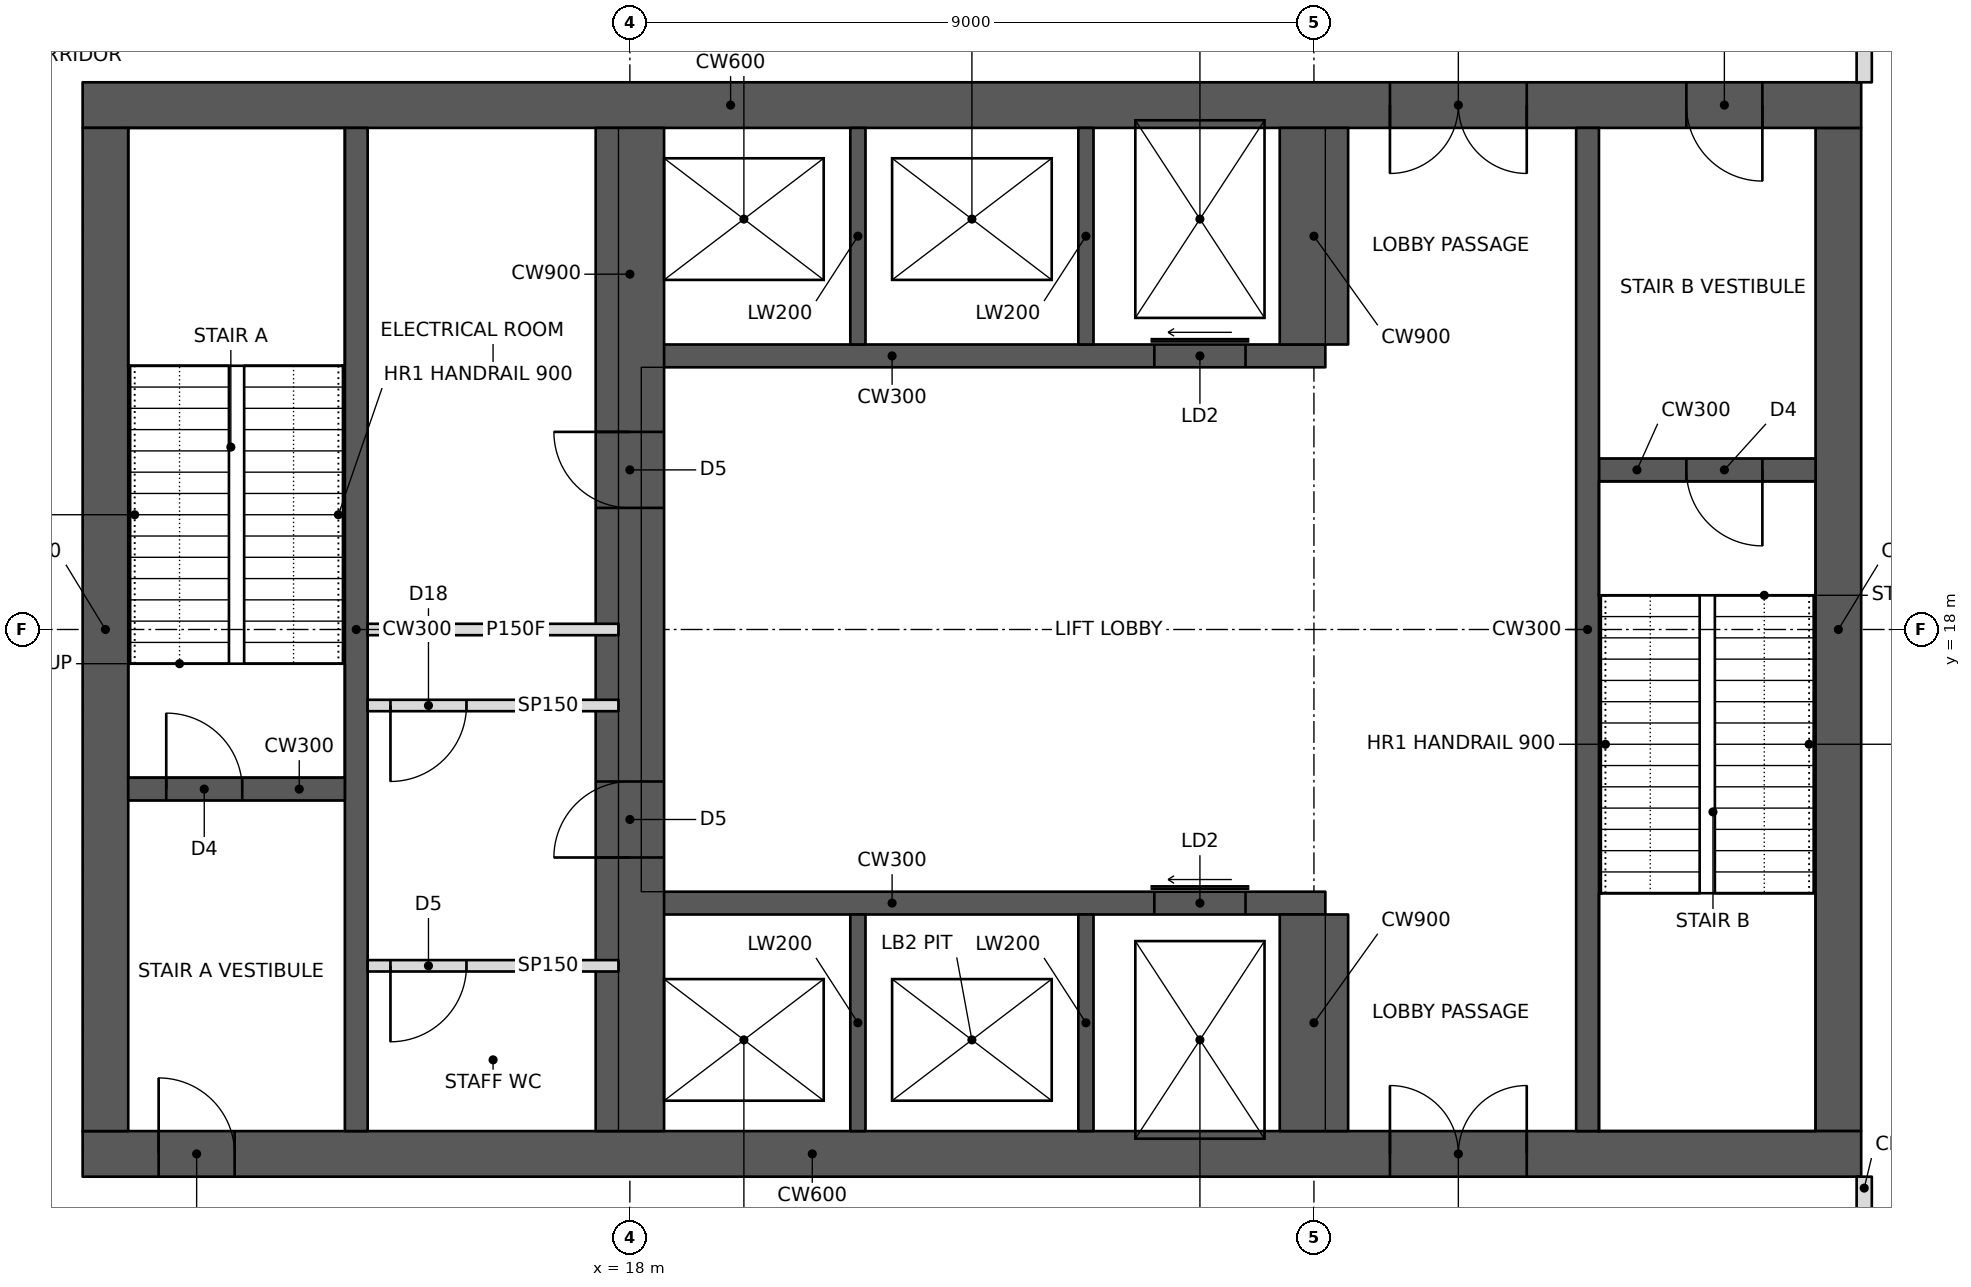
"""IFC4 building model, lengths in metres.
Left out: names, types, materials, properties, quantities, classifications, styles, units other than length and angle.
Written with IfcOpenShell. Run it as: python <this file> out.ifc"""

import sys

from ifc_helpers import new_model, si_unit, direction, frame, frame_2d, origin, place, context, subcontext, project, spatial, rectangle, extrude, element, fill, save


model = new_model("IFC4")
c1 = context("Model", 3, precision=1e-05, world=origin(), true_north=direction((0.0, 1.0)))
c2 = subcontext(c1, "Body", "Model", "MODEL_VIEW")
j1 = project(units=[si_unit("LENGTHUNIT", "METRE"), si_unit("PLANEANGLEUNIT", "RADIAN")], contexts=[c1])
p1 = place(None, origin())
s1 = spatial("IfcSite", under=j1, at=p1, CompositionType="ELEMENT")
p2 = place(p1, origin())
s2 = spatial("IfcBuilding", under=s1, at=p2, CompositionType="ELEMENT")
p3 = place(p2, frame((0.0, 0.0, 89.2)))
s3 = spatial("IfcBuildingStorey", under=s2, at=p3, CompositionType="ELEMENT", Elevation=89.2)
p4 = place(p3, frame((10.8, 11.1, 0.0), z_axis=(0.0, 0.0, 1.0), x_axis=(1.0, 0.0, 0.0)))
e1 = element("IfcWall", 1, at=p4, inside=s3, PredefinedType="SHEAR", context=c2, shape_type="SweptSolid", body=[
    extrude(rectangle(XDim=23.4, YDim=0.6, at=frame_2d((11.7, 0.0))), origin(), (0.0, 0.0, 1.0), 5.0),
])
p5 = place(p4, frame((1.0, 0.0, 0.0)))
e2 = element("IfcOpeningElement", 2, at=p5, cuts=e1, PredefinedType="OPENING", context=c2, shape_type="SweptSolid", body=[
    extrude(rectangle(XDim=1.0, YDim=2.1, at=frame_2d((0.5, 1.05))), frame((0.0, 0.31, 0.0), z_axis=(0.0, -1.0, 0.0), x_axis=(1.0, 0.0, 0.0)), (0.0, 0.0, 1.0), 0.62),
])
p6 = place(p4, frame((17.2, 0.0, 0.0)))
e3 = element("IfcOpeningElement", 3, at=p6, cuts=e1, PredefinedType="OPENING", context=c2, shape_type="SweptSolid", body=[
    extrude(rectangle(XDim=1.8, YDim=2.1, at=frame_2d((0.9, 1.05))), frame((0.0, 0.31, 0.0), z_axis=(0.0, -1.0, 0.0), x_axis=(1.0, 0.0, 0.0)), (0.0, 0.0, 1.0), 0.62),
])
p7 = place(p3, frame((10.8, 24.9, 0.0), z_axis=(0.0, 0.0, 1.0), x_axis=(1.0, 0.0, 0.0)))
e4 = element("IfcWall", 4, at=p7, inside=s3, PredefinedType="SHEAR", context=c2, shape_type="SweptSolid", body=[
    extrude(rectangle(XDim=23.4, YDim=0.6, at=frame_2d((11.7, 0.0))), origin(), (0.0, 0.0, 1.0), 5.0),
])
p8 = place(p7, frame((17.2, 0.0, 0.0)))
e5 = element("IfcOpeningElement", 5, at=p8, cuts=e4, PredefinedType="OPENING", context=c2, shape_type="SweptSolid", body=[
    extrude(rectangle(XDim=1.8, YDim=2.1, at=frame_2d((0.9, 1.05))), frame((0.0, 0.31, 0.0), z_axis=(0.0, -1.0, 0.0), x_axis=(1.0, 0.0, 0.0)), (0.0, 0.0, 1.0), 0.62),
])
p9 = place(p7, frame((21.1, 0.0, 0.0)))
e6 = element("IfcOpeningElement", 6, at=p9, cuts=e4, PredefinedType="OPENING", context=c2, shape_type="SweptSolid", body=[
    extrude(rectangle(XDim=1.0, YDim=2.1, at=frame_2d((0.5, 1.05))), frame((0.0, 0.31, 0.0), z_axis=(0.0, -1.0, 0.0), x_axis=(1.0, 0.0, 0.0)), (0.0, 0.0, 1.0), 0.62),
])
for number, where, z_axis, x_axis in (
    (7, (11.1, 11.4, 0.0), (0.0, 0.0, 1.0), (0.0, 1.0, 0.0)),
    (8, (33.9, 11.4, 0.0), (0.0, 0.0, 1.0), (0.0, 1.0, 0.0)),
):
    element("IfcWall", number, at=place(p3, frame(where, z_axis=z_axis, x_axis=x_axis)), inside=s3, PredefinedType="SHEAR", context=c2, shape_type="SweptSolid", body=[
        extrude(rectangle(XDim=13.2, YDim=0.6, at=frame_2d((6.6, 0.0))), origin(), (0.0, 0.0, 1.0), 5.0),
    ])
p10 = place(p3, frame((14.4, 11.4, 0.0), z_axis=(0.0, 0.0, 1.0), x_axis=(0.0, 1.0, 0.0)))
e9 = element("IfcWall", 9, at=p10, inside=s3, PredefinedType="SHEAR", context=c2, shape_type="SweptSolid", body=[
    extrude(rectangle(XDim=13.2, YDim=0.3, at=frame_2d((6.6, 0.0))), origin(), (0.0, 0.0, 1.0), 5.0),
])
p11 = place(p3, frame((11.4, 15.9, 0.0), z_axis=(0.0, 0.0, 1.0), x_axis=(1.0, 0.0, 0.0)))
e10 = element("IfcWall", 10, at=p11, inside=s3, PredefinedType="SHEAR", context=c2, shape_type="SweptSolid", body=[
    extrude(rectangle(XDim=2.85, YDim=0.3, at=frame_2d((1.425, 0.0))), origin(), (0.0, 0.0, 1.0), 5.0),
])
p12 = place(p11, frame((0.5, 0.0, 0.0)))
e11 = element("IfcOpeningElement", 11, at=p12, cuts=e10, PredefinedType="OPENING", context=c2, shape_type="SweptSolid", body=[
    extrude(rectangle(XDim=1.0, YDim=2.1, at=frame_2d((0.5, 1.05))), frame((0.0, 0.16, 0.0), z_axis=(0.0, -1.0, 0.0), x_axis=(1.0, 0.0, 0.0)), (0.0, 0.0, 1.0), 0.32),
])
p13 = place(p3, frame((18.0, 11.4, 0.0), z_axis=(0.0, 0.0, 1.0), x_axis=(0.0, 1.0, 0.0)))
e12 = element("IfcWall", 12, at=p13, inside=s3, PredefinedType="SHEAR", context=c2, shape_type="SweptSolid", body=[
    extrude(rectangle(XDim=13.2, YDim=0.9, at=frame_2d((6.6, 0.0))), origin(), (0.0, 0.0, 1.0), 5.0),
])
p14 = place(p13, frame((3.6, 0.0, 0.0)))
e13 = element("IfcOpeningElement", 13, at=p14, cuts=e12, PredefinedType="OPENING", context=c2, shape_type="SweptSolid", body=[
    extrude(rectangle(XDim=1.0, YDim=2.1, at=frame_2d((0.5, 1.05))), frame((0.0, 0.46, 0.0), z_axis=(0.0, -1.0, 0.0), x_axis=(1.0, 0.0, 0.0)), (0.0, 0.0, 1.0), 0.92),
])
p15 = place(p13, frame((8.2, 0.0, 0.0)))
e14 = element("IfcOpeningElement", 14, at=p15, cuts=e12, PredefinedType="OPENING", context=c2, shape_type="SweptSolid", body=[
    extrude(rectangle(XDim=1.0, YDim=2.1, at=frame_2d((0.5, 1.05))), frame((0.0, 0.46, 0.0), z_axis=(0.0, -1.0, 0.0), x_axis=(1.0, 0.0, 0.0)), (0.0, 0.0, 1.0), 0.92),
])
p16 = place(p3, frame((14.55, 18.0, 0.0), z_axis=(0.0, 0.0, 1.0), x_axis=(1.0, 0.0, 0.0)))
e15 = element("IfcWall", 15, at=p16, inside=s3, PredefinedType="PARTITIONING", context=c2, shape_type="SweptSolid", body=[
    extrude(rectangle(XDim=3.3, YDim=0.15, at=frame_2d((1.65, 0.0))), origin(), (0.0, 0.0, 1.0), 4.8),
])
p17 = place(p3, frame((18.15, 14.4, 0.0), z_axis=(0.0, 0.0, 1.0), x_axis=(1.0, 0.0, 0.0)))
e16 = element("IfcWall", 16, at=p17, inside=s3, PredefinedType="SHEAR", context=c2, shape_type="SweptSolid", body=[
    extrude(rectangle(XDim=9.0, YDim=0.3, at=frame_2d((4.5, 0.0))), origin(), (0.0, 0.0, 1.0), 5.0),
])
p18 = place(p17, frame((6.75, 0.0, 0.0)))
e17 = element("IfcOpeningElement", 17, at=p18, cuts=e16, PredefinedType="OPENING", context=c2, shape_type="SweptSolid", body=[
    extrude(rectangle(XDim=1.2, YDim=2.1, at=frame_2d((0.6, 1.05))), frame((0.0, 0.16, 0.0), z_axis=(0.0, -1.0, 0.0), x_axis=(1.0, 0.0, 0.0)), (0.0, 0.0, 1.0), 0.32),
])
p19 = place(p3, frame((27.0, 11.4, 0.0), z_axis=(0.0, 0.0, 1.0), x_axis=(0.0, 1.0, 0.0)))
e18 = element("IfcWall", 18, at=p19, inside=s3, PredefinedType="SHEAR", context=c2, shape_type="SweptSolid", body=[
    extrude(rectangle(XDim=2.85, YDim=0.9, at=frame_2d((1.425, 0.0))), origin(), (0.0, 0.0, 1.0), 5.0),
])
for number, where, z_axis, x_axis in (
    (19, (21.0, 11.4, 0.0), (0.0, 0.0, 1.0), (0.0, 1.0, 0.0)),
    (20, (24.0, 11.4, 0.0), (0.0, 0.0, 1.0), (0.0, 1.0, 0.0)),
):
    element("IfcWall", number, at=place(p3, frame(where, z_axis=z_axis, x_axis=x_axis)), inside=s3, PredefinedType="SHEAR", context=c2, shape_type="SweptSolid", body=[
        extrude(rectangle(XDim=2.85, YDim=0.2, at=frame_2d((1.425, 0.0))), origin(), (0.0, 0.0, 1.0), 5.0),
    ])
p20 = place(p3, frame((18.15, 21.6, 0.0), z_axis=(0.0, 0.0, 1.0), x_axis=(1.0, 0.0, 0.0)))
e21 = element("IfcWall", 21, at=p20, inside=s3, PredefinedType="SHEAR", context=c2, shape_type="SweptSolid", body=[
    extrude(rectangle(XDim=9.0, YDim=0.3, at=frame_2d((4.5, 0.0))), origin(), (0.0, 0.0, 1.0), 5.0),
])
p21 = place(p20, frame((6.75, 0.0, 0.0)))
e22 = element("IfcOpeningElement", 22, at=p21, cuts=e21, PredefinedType="OPENING", context=c2, shape_type="SweptSolid", body=[
    extrude(rectangle(XDim=1.2, YDim=2.1, at=frame_2d((0.6, 1.05))), frame((0.0, 0.16, 0.0), z_axis=(0.0, -1.0, 0.0), x_axis=(1.0, 0.0, 0.0)), (0.0, 0.0, 1.0), 0.32),
])
p22 = place(p3, frame((27.0, 21.75, 0.0), z_axis=(0.0, 0.0, 1.0), x_axis=(0.0, 1.0, 0.0)))
e23 = element("IfcWall", 23, at=p22, inside=s3, PredefinedType="SHEAR", context=c2, shape_type="SweptSolid", body=[
    extrude(rectangle(XDim=2.85, YDim=0.9, at=frame_2d((1.425, 0.0))), origin(), (0.0, 0.0, 1.0), 5.0),
])
for number, where, z_axis, x_axis in (
    (24, (21.0, 21.75, 0.0), (0.0, 0.0, 1.0), (0.0, 1.0, 0.0)),
    (25, (24.0, 21.75, 0.0), (0.0, 0.0, 1.0), (0.0, 1.0, 0.0)),
):
    element("IfcWall", number, at=place(p3, frame(where, z_axis=z_axis, x_axis=x_axis)), inside=s3, PredefinedType="SHEAR", context=c2, shape_type="SweptSolid", body=[
        extrude(rectangle(XDim=2.85, YDim=0.2, at=frame_2d((1.425, 0.0))), origin(), (0.0, 0.0, 1.0), 5.0),
    ])
p23 = place(p3, frame((30.6, 11.4, 0.0), z_axis=(0.0, 0.0, 1.0), x_axis=(0.0, 1.0, 0.0)))
e26 = element("IfcWall", 26, at=p23, inside=s3, PredefinedType="SHEAR", context=c2, shape_type="SweptSolid", body=[
    extrude(rectangle(XDim=13.2, YDim=0.3, at=frame_2d((6.6, 0.0))), origin(), (0.0, 0.0, 1.0), 5.0),
])
p24 = place(p3, frame((30.75, 20.1, 0.0), z_axis=(0.0, 0.0, 1.0), x_axis=(1.0, 0.0, 0.0)))
e27 = element("IfcWall", 27, at=p24, inside=s3, PredefinedType="SHEAR", context=c2, shape_type="SweptSolid", body=[
    extrude(rectangle(XDim=2.85, YDim=0.3, at=frame_2d((1.425, 0.0))), origin(), (0.0, 0.0, 1.0), 5.0),
])
p25 = place(p24, frame((1.15, 0.0, 0.0)))
e28 = element("IfcOpeningElement", 28, at=p25, cuts=e27, PredefinedType="OPENING", context=c2, shape_type="SweptSolid", body=[
    extrude(rectangle(XDim=1.0, YDim=2.1, at=frame_2d((0.5, 1.05))), frame((0.0, 0.16, 0.0), z_axis=(0.0, -1.0, 0.0), x_axis=(1.0, 0.0, 0.0)), (0.0, 0.0, 1.0), 0.32),
])
p26 = place(p3, frame((34.24, 9.1, 0.0), z_axis=(0.0, 0.0, 1.0), x_axis=(0.0, 1.0, 0.0)))
e29 = element("IfcWall", 29, at=p26, inside=s3, PredefinedType="PARTITIONING", context=c2, shape_type="SweptSolid", body=[
    extrude(rectangle(XDim=1.7, YDim=0.2, at=frame_2d((0.85, 0.0))), origin(), (0.0, 0.0, 1.0), 4.004),
])
p27 = place(p26, frame((0.25, 0.0, 0.0)))
e30 = element("IfcOpeningElement", 30, at=p27, cuts=e29, PredefinedType="OPENING", context=c2, shape_type="SweptSolid", body=[
    extrude(rectangle(XDim=1.0, YDim=2.1, at=frame_2d((0.5, 1.05))), frame((0.0, 0.11, 0.0), z_axis=(0.0, -1.0, 0.0), x_axis=(1.0, 0.0, 0.0)), (0.0, 0.0, 1.0), 0.22),
])
p28 = place(p3, frame((34.24, 25.2, 0.0), z_axis=(0.0, 0.0, 1.0), x_axis=(0.0, 1.0, 0.0)))
e31 = element("IfcWall", 31, at=p28, inside=s3, PredefinedType="PARTITIONING", context=c2, shape_type="SweptSolid", body=[
    extrude(rectangle(XDim=1.7, YDim=0.2, at=frame_2d((0.85, 0.0))), origin(), (0.0, 0.0, 1.0), 4.004),
])
p29 = place(p3, frame((14.55, 17.0, 0.0), z_axis=(0.0, 0.0, 1.0), x_axis=(1.0, 0.0, 0.0)))
e32 = element("IfcWall", 32, at=p29, inside=s3, PredefinedType="PARTITIONING", context=c2, shape_type="SweptSolid", body=[
    extrude(rectangle(XDim=3.3, YDim=0.15, at=frame_2d((1.65, 0.0))), origin(), (0.0, 0.0, 1.0), 4.8),
])
p30 = place(p29, frame((0.3, 0.0, 0.0)))
e33 = element("IfcOpeningElement", 33, at=p30, cuts=e32, PredefinedType="OPENING", context=c2, shape_type="SweptSolid", body=[
    extrude(rectangle(XDim=1.0, YDim=2.1, at=frame_2d((0.5, 1.05))), frame((0.0, 0.085, 0.0), z_axis=(0.0, -1.0, 0.0), x_axis=(1.0, 0.0, 0.0)), (0.0, 0.0, 1.0), 0.17),
])
p31 = place(p3, frame((14.55, 13.575, 0.0), z_axis=(0.0, 0.0, 1.0), x_axis=(1.0, 0.0, 0.0)))
e34 = element("IfcWall", 34, at=p31, inside=s3, PredefinedType="PARTITIONING", context=c2, shape_type="SweptSolid", body=[
    extrude(rectangle(XDim=3.3, YDim=0.15, at=frame_2d((1.65, 0.0))), origin(), (0.0, 0.0, 1.0), 4.8),
])
p32 = place(p31, frame((0.3, 0.0, 0.0)))
e35 = element("IfcOpeningElement", 35, at=p32, cuts=e34, PredefinedType="OPENING", context=c2, shape_type="SweptSolid", body=[
    extrude(rectangle(XDim=1.0, YDim=2.1, at=frame_2d((0.5, 1.05))), frame((0.0, 0.085, 0.0), z_axis=(0.0, -1.0, 0.0), x_axis=(1.0, 0.0, 0.0)), (0.0, 0.0, 1.0), 0.17),
])
p33 = place(p30, frame((1.0, 0.0, 0.0), z_axis=(0.0, 0.0, 1.0), x_axis=(-1.0, 0.0, 0.0)))
e36 = element("IfcDoor", 36, at=p33, inside=s3, OperationType="SINGLE_SWING_RIGHT", PredefinedType="DOOR", context=c2, shape_type="SweptSolid", body=[
    extrude(rectangle(XDim=1.0, YDim=2.1, at=frame_2d((0.5, 1.05))), frame((0.0, 0.025, 0.0), z_axis=(0.0, -1.0, 0.0), x_axis=(1.0, 0.0, 0.0)), (0.0, 0.0, 1.0), 0.05),
])
fill(e33, e36)
p34 = place(p32, frame((1.0, 0.0, 0.0), z_axis=(0.0, 0.0, 1.0), x_axis=(-1.0, 0.0, 0.0)))
e37 = element("IfcDoor", 37, at=p34, inside=s3, OperationType="SINGLE_SWING_RIGHT", PredefinedType="DOOR", context=c2, shape_type="SweptSolid", body=[
    extrude(rectangle(XDim=1.0, YDim=2.1, at=frame_2d((0.5, 1.05))), frame((0.0, 0.025, 0.0), z_axis=(0.0, -1.0, 0.0), x_axis=(1.0, 0.0, 0.0)), (0.0, 0.0, 1.0), 0.05),
])
fill(e35, e37)
p35 = place(p5, origin())
e38 = element("IfcDoor", 38, at=p35, inside=s3, OperationType="SINGLE_SWING_LEFT", PredefinedType="DOOR", context=c2, shape_type="SweptSolid", body=[
    extrude(rectangle(XDim=1.0, YDim=2.1, at=frame_2d((0.5, 1.05))), frame((0.0, 0.025, 0.0), z_axis=(0.0, -1.0, 0.0), x_axis=(1.0, 0.0, 0.0)), (0.0, 0.0, 1.0), 0.05),
])
fill(e2, e38)
p36 = place(p12, origin())
e39 = element("IfcDoor", 39, at=p36, inside=s3, OperationType="SINGLE_SWING_LEFT", PredefinedType="DOOR", context=c2, shape_type="SweptSolid", body=[
    extrude(rectangle(XDim=1.0, YDim=2.1, at=frame_2d((0.5, 1.05))), frame((0.0, 0.025, 0.0), z_axis=(0.0, -1.0, 0.0), x_axis=(1.0, 0.0, 0.0)), (0.0, 0.0, 1.0), 0.05),
])
fill(e11, e39)
p37 = place(p6, origin())
e40 = element("IfcDoor", 40, at=p37, inside=s3, OperationType="DOUBLE_DOOR_SINGLE_SWING", PredefinedType="DOOR", context=c2, shape_type="SweptSolid", body=[
    extrude(rectangle(XDim=1.8, YDim=2.1, at=frame_2d((0.9, 1.05))), frame((0.0, 0.025, 0.0), z_axis=(0.0, -1.0, 0.0), x_axis=(1.0, 0.0, 0.0)), (0.0, 0.0, 1.0), 0.05),
])
fill(e3, e40)
p38 = place(p8, frame((1.8, 0.0, 0.0), z_axis=(0.0, 0.0, 1.0), x_axis=(-1.0, 0.0, 0.0)))
e41 = element("IfcDoor", 41, at=p38, inside=s3, OperationType="DOUBLE_DOOR_SINGLE_SWING", PredefinedType="DOOR", context=c2, shape_type="SweptSolid", body=[
    extrude(rectangle(XDim=1.8, YDim=2.1, at=frame_2d((0.9, 1.05))), frame((0.0, 0.025, 0.0), z_axis=(0.0, -1.0, 0.0), x_axis=(1.0, 0.0, 0.0)), (0.0, 0.0, 1.0), 0.05),
])
fill(e5, e41)
p39 = place(p9, frame((1.0, 0.0, 0.0), z_axis=(0.0, 0.0, 1.0), x_axis=(-1.0, 0.0, 0.0)))
e42 = element("IfcDoor", 42, at=p39, inside=s3, OperationType="SINGLE_SWING_LEFT", PredefinedType="DOOR", context=c2, shape_type="SweptSolid", body=[
    extrude(rectangle(XDim=1.0, YDim=2.1, at=frame_2d((0.5, 1.05))), frame((0.0, 0.025, 0.0), z_axis=(0.0, -1.0, 0.0), x_axis=(1.0, 0.0, 0.0)), (0.0, 0.0, 1.0), 0.05),
])
fill(e6, e42)
p40 = place(p25, frame((1.0, 0.0, 0.0), z_axis=(0.0, 0.0, 1.0), x_axis=(-1.0, 0.0, 0.0)))
e43 = element("IfcDoor", 43, at=p40, inside=s3, OperationType="SINGLE_SWING_LEFT", PredefinedType="DOOR", context=c2, shape_type="SweptSolid", body=[
    extrude(rectangle(XDim=1.0, YDim=2.1, at=frame_2d((0.5, 1.05))), frame((0.0, 0.025, 0.0), z_axis=(0.0, -1.0, 0.0), x_axis=(1.0, 0.0, 0.0)), (0.0, 0.0, 1.0), 0.05),
])
fill(e28, e43)
p41 = place(p14, origin())
e44 = element("IfcDoor", 44, at=p41, inside=s3, OperationType="SINGLE_SWING_LEFT", PredefinedType="DOOR", context=c2, shape_type="SweptSolid", body=[
    extrude(rectangle(XDim=1.0, YDim=2.1, at=frame_2d((0.5, 1.05))), frame((0.0, 0.025, 0.0), z_axis=(0.0, -1.0, 0.0), x_axis=(1.0, 0.0, 0.0)), (0.0, 0.0, 1.0), 0.05),
])
fill(e13, e44)
p42 = place(p15, origin())
e45 = element("IfcDoor", 45, at=p42, inside=s3, OperationType="SINGLE_SWING_RIGHT", PredefinedType="DOOR", context=c2, shape_type="SweptSolid", body=[
    extrude(rectangle(XDim=1.0, YDim=2.1, at=frame_2d((0.5, 1.05))), frame((0.0, 0.025, 0.0), z_axis=(0.0, -1.0, 0.0), x_axis=(1.0, 0.0, 0.0)), (0.0, 0.0, 1.0), 0.05),
])
fill(e14, e45)
p43 = place(p18, origin())
e46 = element("IfcDoor", 46, at=p43, inside=s3, OperationType="SLIDING_TO_LEFT", PredefinedType="DOOR", context=c2, shape_type="SweptSolid", body=[
    extrude(rectangle(XDim=1.2, YDim=2.1, at=frame_2d((0.6, 1.05))), frame((0.0, 0.025, 0.0), z_axis=(0.0, -1.0, 0.0), x_axis=(1.0, 0.0, 0.0)), (0.0, 0.0, 1.0), 0.05),
])
fill(e17, e46)
p44 = place(p21, origin())
e47 = element("IfcDoor", 47, at=p44, inside=s3, OperationType="SLIDING_TO_LEFT", PredefinedType="DOOR", context=c2, shape_type="SweptSolid", body=[
    extrude(rectangle(XDim=1.2, YDim=2.1, at=frame_2d((0.6, 1.05))), frame((0.0, 0.025, 0.0), z_axis=(0.0, -1.0, 0.0), x_axis=(1.0, 0.0, 0.0)), (0.0, 0.0, 1.0), 0.05),
])
fill(e22, e47)
save(model, sys.argv[1])
